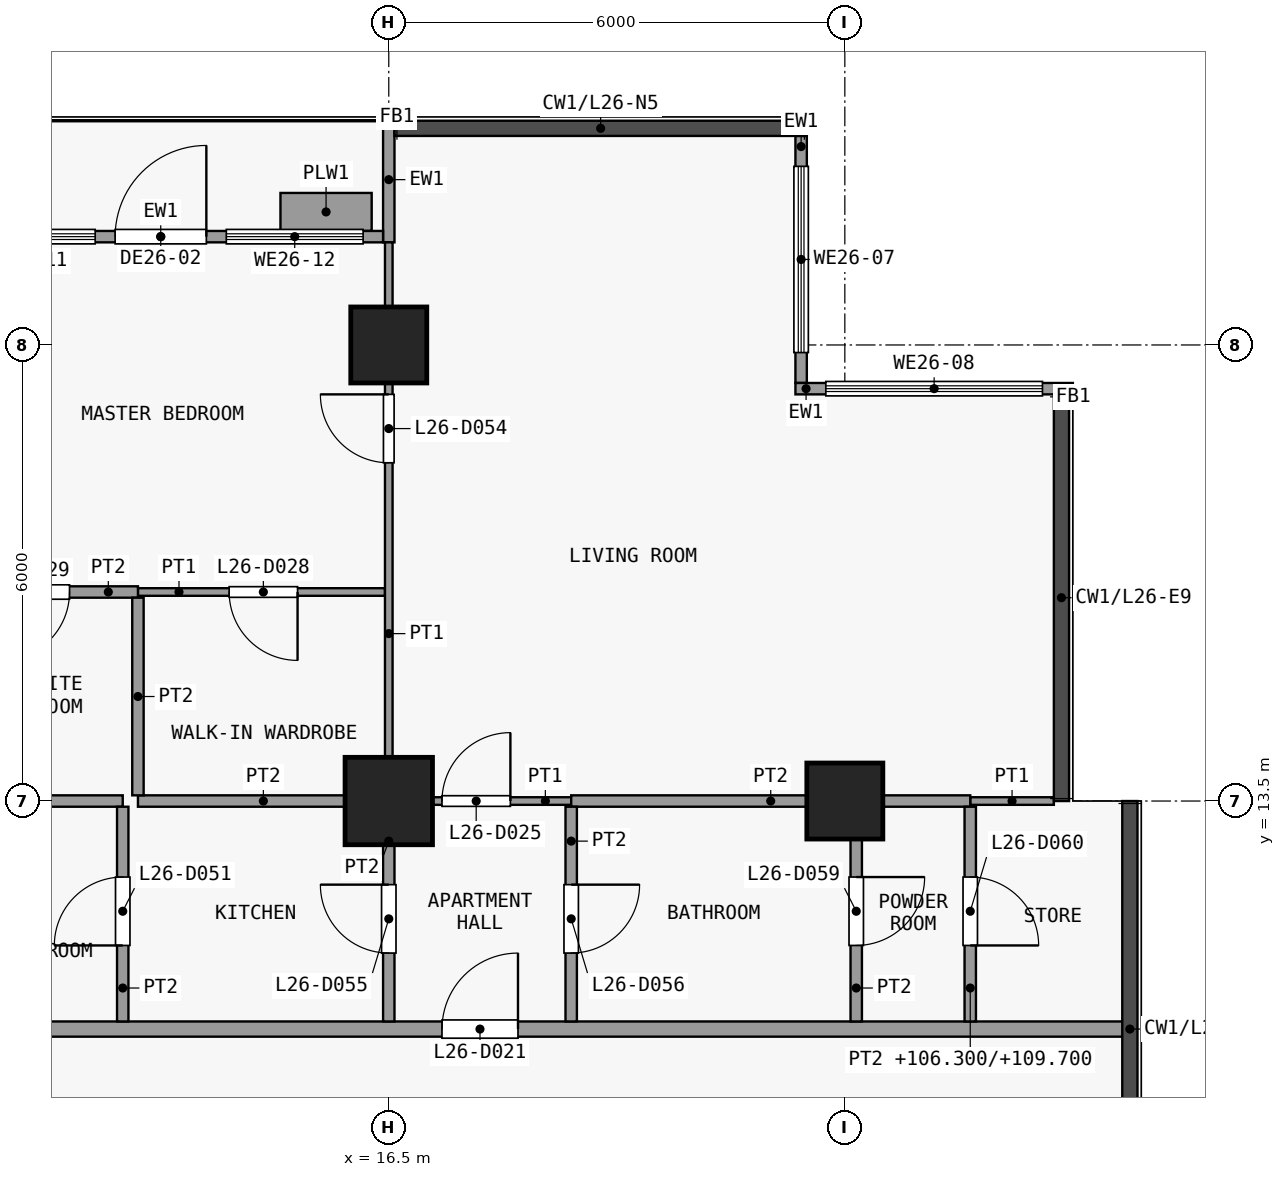
"""IFC4 building model, lengths in metres.
Left out: names, types, materials, properties, quantities, classifications, styles, units other than length and angle.
Written with IfcOpenShell. Run it as: python <this file> out.ifc"""

import sys

from ifc_helpers import new_model, si_unit, direction, frame, frame_2d, origin, origin_2d, place, context, subcontext, project, spatial, rectangle, extrude, element, fill, save


model = new_model("IFC4")
c1 = context("Model", 3, precision=1e-05, world=origin(), true_north=direction((0.0, 1.0)))
c2 = subcontext(c1, "Body", "Model", "MODEL_VIEW")
j1 = project(units=[si_unit("LENGTHUNIT", "METRE"), si_unit("PLANEANGLEUNIT", "RADIAN")], contexts=[c1])
p1 = place(None, origin())
s1 = spatial("IfcSite", under=j1, at=p1, CompositionType="ELEMENT")
p2 = place(p1, origin())
s2 = spatial("IfcBuilding", under=s1, at=p2, CompositionType="ELEMENT")
p3 = place(p2, frame((0.0, 0.0, 106.3)))
s3 = spatial("IfcBuildingStorey", under=s2, at=p3, CompositionType="ELEMENT", Elevation=106.3)
p4 = place(p3, frame((16.5, 13.5, 0.0), z_axis=(0.0, 0.0, 1.0), x_axis=(1.0, 0.0, 0.0)))
e1 = element("IfcColumn", 1, at=p4, inside=s3, PredefinedType="COLUMN", context=c2, shape_type="SweptSolid", body=[
    extrude(rectangle(XDim=1.15, YDim=1.15, at=origin_2d()), origin(), (0.0, 0.0, 1.0), 3.6),
])
for number, where, z_axis, x_axis in (
    (2, (16.5, 19.5, 0.0), (0.0, 0.0, 1.0), (1.0, 0.0, 0.0)),
    (3, (22.5, 13.5, 0.0), (0.0, 0.0, 1.0), (1.0, 0.0, 0.0)),
):
    element("IfcColumn", number, at=place(p3, frame(where, z_axis=z_axis, x_axis=x_axis)), inside=s3, PredefinedType="COLUMN", context=c2, shape_type="SweptSolid", body=[
        extrude(rectangle(XDim=1.0, YDim=1.0, at=origin_2d()), origin(), (0.0, 0.0, 1.0), 3.6),
    ])
p5 = place(p3, frame((21.925, 22.25, 0.0), z_axis=(0.0, 0.0, 1.0), x_axis=(0.0, -1.0, 0.0)))
e4 = element("IfcWall", 4, at=p5, inside=s3, PredefinedType="SOLIDWALL", context=c2, shape_type="SweptSolid", body=[
    extrude(rectangle(XDim=3.25, YDim=0.15, at=frame_2d((1.625, 0.0))), origin(), (0.0, 0.0, 1.0), 3.3),
])
p6 = place(p5, frame((0.4, 0.0, 0.9)))
e5 = element("IfcOpeningElement", 5, at=p6, cuts=e4, PredefinedType="OPENING", context=c2, shape_type="SweptSolid", body=[
    extrude(rectangle(XDim=2.45, YDim=2.4, at=frame_2d((1.225, 1.2))), frame((0.0, 0.085, 0.0), z_axis=(0.0, -1.0, 0.0), x_axis=(1.0, 0.0, 0.0)), (0.0, 0.0, 1.0), 0.17),
])
p7 = place(p3, frame((21.85, 18.925, 0.0), z_axis=(0.0, 0.0, 1.0), x_axis=(1.0, 0.0, 0.0)))
e6 = element("IfcWall", 6, at=p7, inside=s3, PredefinedType="SOLIDWALL", context=c2, shape_type="SweptSolid", body=[
    extrude(rectangle(XDim=3.65, YDim=0.15, at=frame_2d((1.825, 0.0))), origin(), (0.0, 0.0, 1.0), 3.3),
])
p8 = place(p7, frame((0.4, 0.0, 0.9)))
e7 = element("IfcOpeningElement", 7, at=p8, cuts=e6, PredefinedType="OPENING", context=c2, shape_type="SweptSolid", body=[
    extrude(rectangle(XDim=2.85, YDim=2.4, at=frame_2d((1.425, 1.2))), frame((0.0, 0.085, 0.0), z_axis=(0.0, -1.0, 0.0), x_axis=(1.0, 0.0, 0.0)), (0.0, 0.0, 1.0), 0.17),
])
p9 = place(p3, frame((16.5, 20.85, 0.0), z_axis=(0.0, 0.0, 1.0), x_axis=(0.0, 1.0, 0.0)))
e8 = element("IfcWall", 8, at=p9, inside=s3, PredefinedType="SOLIDWALL", context=c2, shape_type="SweptSolid", body=[
    extrude(rectangle(XDim=1.65, YDim=0.15, at=frame_2d((0.825, 0.0))), origin(), (0.0, 0.0, 1.0), 3.3),
])
p10 = place(p3, frame((10.575, 20.925, 0.0), z_axis=(0.0, 0.0, 1.0), x_axis=(1.0, 0.0, 0.0)))
e9 = element("IfcWall", 9, at=p10, inside=s3, PredefinedType="SOLIDWALL", context=c2, shape_type="SweptSolid", body=[
    extrude(rectangle(XDim=5.85, YDim=0.15, at=frame_2d((2.925, 0.0))), origin(), (0.0, 0.0, 1.0), 3.3),
])
p11 = place(p10, frame((2.325, 0.0, 0.0)))
e10 = element("IfcOpeningElement", 10, at=p11, cuts=e9, PredefinedType="OPENING", context=c2, shape_type="SweptSolid", body=[
    extrude(rectangle(XDim=1.2, YDim=2.4, at=frame_2d((0.6, 1.2))), frame((0.0, 0.085, 0.0), z_axis=(0.0, -1.0, 0.0), x_axis=(1.0, 0.0, 0.0)), (0.0, 0.0, 1.0), 0.17),
])
p12 = place(p10, frame((0.262, 0.0, 0.9)))
e11 = element("IfcOpeningElement", 11, at=p12, cuts=e9, PredefinedType="OPENING", context=c2, shape_type="SweptSolid", body=[
    extrude(rectangle(XDim=1.8, YDim=2.1, at=frame_2d((0.9, 1.05))), frame((0.0, 0.085, 0.0), z_axis=(0.0, -1.0, 0.0), x_axis=(1.0, 0.0, 0.0)), (0.0, 0.0, 1.0), 0.17),
])
p13 = place(p10, frame((3.788, 0.0, 0.9)))
e12 = element("IfcOpeningElement", 12, at=p13, cuts=e9, PredefinedType="OPENING", context=c2, shape_type="SweptSolid", body=[
    extrude(rectangle(XDim=1.8, YDim=2.1, at=frame_2d((0.9, 1.05))), frame((0.0, 0.085, 0.0), z_axis=(0.0, -1.0, 0.0), x_axis=(1.0, 0.0, 0.0)), (0.0, 0.0, 1.0), 0.17),
])
p14 = place(p3, frame((15.075, 21.25, 0.0), z_axis=(0.0, 0.0, 1.0), x_axis=(1.0, 0.0, 0.0)))
e13 = element("IfcWall", 13, at=p14, inside=s3, PredefinedType="USERDEFINED", context=c2, shape_type="SweptSolid", body=[
    extrude(rectangle(XDim=1.2, YDim=0.5, at=frame_2d((0.6, 0.0))), origin(), (0.0, 0.0, 1.0), 0.9),
])
p15 = place(p3, frame((-23.85, 10.5, 0.0), z_axis=(0.0, 0.0, 1.0), x_axis=(1.0, 0.0, 0.0)))
e14 = element("IfcWall", 14, at=p15, inside=s3, PredefinedType="PARTITIONING", context=c2, shape_type="SweptSolid", body=[
    extrude(rectangle(XDim=50.1, YDim=0.2, at=frame_2d((25.05, 0.0))), origin(), (0.0, 0.0, 1.0), 3.3),
])
p16 = place(p15, frame((9.05, 0.0, 0.0)))
e15 = element("IfcOpeningElement", 15, at=p16, cuts=e14, PredefinedType="OPENING", context=c2, shape_type="SweptSolid", body=[
    extrude(rectangle(XDim=1.0, YDim=2.1, at=frame_2d((0.5, 1.05))), frame((0.0, 0.11, 0.0), z_axis=(0.0, -1.0, 0.0), x_axis=(1.0, 0.0, 0.0)), (0.0, 0.0, 1.0), 0.22),
])
p17 = place(p15, frame((14.05, 0.0, 0.0)))
e16 = element("IfcOpeningElement", 16, at=p17, cuts=e14, PredefinedType="OPENING", context=c2, shape_type="SweptSolid", body=[
    extrude(rectangle(XDim=1.0, YDim=2.1, at=frame_2d((0.5, 1.05))), frame((0.0, 0.11, 0.0), z_axis=(0.0, -1.0, 0.0), x_axis=(1.0, 0.0, 0.0)), (0.0, 0.0, 1.0), 0.22),
])
p18 = place(p15, frame((29.05, 0.0, 0.0)))
e17 = element("IfcOpeningElement", 17, at=p18, cuts=e14, PredefinedType="OPENING", context=c2, shape_type="SweptSolid", body=[
    extrude(rectangle(XDim=1.0, YDim=2.1, at=frame_2d((0.5, 1.05))), frame((0.0, 0.11, 0.0), z_axis=(0.0, -1.0, 0.0), x_axis=(1.0, 0.0, 0.0)), (0.0, 0.0, 1.0), 0.22),
])
p19 = place(p15, frame((41.05, 0.0, 0.0)))
e18 = element("IfcOpeningElement", 18, at=p19, cuts=e14, PredefinedType="OPENING", context=c2, shape_type="SweptSolid", body=[
    extrude(rectangle(XDim=1.0, YDim=2.1, at=frame_2d((0.5, 1.05))), frame((0.0, 0.11, 0.0), z_axis=(0.0, -1.0, 0.0), x_axis=(1.0, 0.0, 0.0)), (0.0, 0.0, 1.0), 0.22),
])
p20 = place(p3, frame((16.5, 13.5, 0.0), z_axis=(0.0, 0.0, 1.0), x_axis=(1.0, 0.0, 0.0)))
e19 = element("IfcWall", 19, at=p20, inside=s3, PredefinedType="PARTITIONING", context=c2, shape_type="SweptSolid", body=[
    extrude(rectangle(XDim=2.4, YDim=0.1, at=frame_2d((1.2, 0.0))), origin(), (0.0, 0.0, 1.0), 3.3),
])
p21 = place(p20, frame((0.7, 0.0, 0.0)))
e20 = element("IfcOpeningElement", 20, at=p21, cuts=e19, PredefinedType="OPENING", context=c2, shape_type="SweptSolid", body=[
    extrude(rectangle(XDim=0.9, YDim=2.1, at=frame_2d((0.45, 1.05))), frame((0.0, 0.06, 0.0), z_axis=(0.0, -1.0, 0.0), x_axis=(1.0, 0.0, 0.0)), (0.0, 0.0, 1.0), 0.12),
])
p22 = place(p3, frame((24.15, 13.5, 0.0), z_axis=(0.0, 0.0, 1.0), x_axis=(1.0, 0.0, 0.0)))
e21 = element("IfcWall", 21, at=p22, inside=s3, PredefinedType="PARTITIONING", context=c2, shape_type="SweptSolid", body=[
    extrude(rectangle(XDim=1.1, YDim=0.1, at=frame_2d((0.55, 0.0))), origin(), (0.0, 0.0, 1.0), 3.3),
])
p23 = place(p3, frame((6.9, 13.5, 0.0), z_axis=(0.0, 0.0, 1.0), x_axis=(1.0, 0.0, 0.0)))
e22 = element("IfcWall", 22, at=p23, inside=s3, PredefinedType="PARTITIONING", context=c2, shape_type="SweptSolid", body=[
    extrude(rectangle(XDim=6.1, YDim=0.15, at=frame_2d((3.05, 0.0))), origin(), (0.0, 0.0, 1.0), 3.3),
])
p24 = place(p3, frame((13.2, 13.5, 0.0), z_axis=(0.0, 0.0, 1.0), x_axis=(1.0, 0.0, 0.0)))
e23 = element("IfcWall", 23, at=p24, inside=s3, PredefinedType="PARTITIONING", context=c2, shape_type="SweptSolid", body=[
    extrude(rectangle(XDim=3.3, YDim=0.15, at=frame_2d((1.65, 0.0))), origin(), (0.0, 0.0, 1.0), 3.3),
])
p25 = place(p3, frame((18.9, 13.5, 0.0), z_axis=(0.0, 0.0, 1.0), x_axis=(1.0, 0.0, 0.0)))
e24 = element("IfcWall", 24, at=p25, inside=s3, PredefinedType="PARTITIONING", context=c2, shape_type="SweptSolid", body=[
    extrude(rectangle(XDim=5.25, YDim=0.15, at=frame_2d((2.625, 0.0))), origin(), (0.0, 0.0, 1.0), 3.3),
])
p26 = place(p3, frame((13.2, 16.25, 0.0), z_axis=(0.0, 0.0, 1.0), x_axis=(1.0, 0.0, 0.0)))
e25 = element("IfcWall", 25, at=p26, inside=s3, PredefinedType="PARTITIONING", context=c2, shape_type="SweptSolid", body=[
    extrude(rectangle(XDim=3.25, YDim=0.1, at=frame_2d((1.625, 0.0))), origin(), (0.0, 0.0, 1.0), 3.3),
])
p27 = place(p26, frame((1.2, 0.0, 0.0)))
e26 = element("IfcOpeningElement", 26, at=p27, cuts=e25, PredefinedType="OPENING", context=c2, shape_type="SweptSolid", body=[
    extrude(rectangle(XDim=0.9, YDim=2.1, at=frame_2d((0.45, 1.05))), frame((0.0, 0.06, 0.0), z_axis=(0.0, -1.0, 0.0), x_axis=(1.0, 0.0, 0.0)), (0.0, 0.0, 1.0), 0.12),
])
p28 = place(p3, frame((10.6, 16.25, 0.0), z_axis=(0.0, 0.0, 1.0), x_axis=(1.0, 0.0, 0.0)))
e27 = element("IfcWall", 27, at=p28, inside=s3, PredefinedType="PARTITIONING", context=c2, shape_type="SweptSolid", body=[
    extrude(rectangle(XDim=2.6, YDim=0.15, at=frame_2d((1.3, 0.0))), origin(), (0.0, 0.0, 1.0), 3.3),
])
p29 = place(p28, frame((0.8, 0.0, 0.0)))
e28 = element("IfcOpeningElement", 28, at=p29, cuts=e27, PredefinedType="OPENING", context=c2, shape_type="SweptSolid", body=[
    extrude(rectangle(XDim=0.9, YDim=2.1, at=frame_2d((0.45, 1.05))), frame((0.0, 0.085, 0.0), z_axis=(0.0, -1.0, 0.0), x_axis=(1.0, 0.0, 0.0)), (0.0, 0.0, 1.0), 0.17),
])
p30 = place(p3, frame((13.0, 10.6, 0.0), z_axis=(0.0, 0.0, 1.0), x_axis=(0.0, 1.0, 0.0)))
e29 = element("IfcWall", 29, at=p30, inside=s3, PredefinedType="PARTITIONING", context=c2, shape_type="SweptSolid", body=[
    extrude(rectangle(XDim=2.825, YDim=0.15, at=frame_2d((1.413, 0.0))), origin(), (0.0, 0.0, 1.0), 3.3),
])
p31 = place(p30, frame((1.0, 0.0, 0.0)))
e30 = element("IfcOpeningElement", 30, at=p31, cuts=e29, PredefinedType="OPENING", context=c2, shape_type="SweptSolid", body=[
    extrude(rectangle(XDim=0.9, YDim=2.1, at=frame_2d((0.45, 1.05))), frame((0.0, 0.085, 0.0), z_axis=(0.0, -1.0, 0.0), x_axis=(1.0, 0.0, 0.0)), (0.0, 0.0, 1.0), 0.17),
])
p32 = place(p3, frame((13.2, 13.575, 0.0), z_axis=(0.0, 0.0, 1.0), x_axis=(0.0, 1.0, 0.0)))
e31 = element("IfcWall", 31, at=p32, inside=s3, PredefinedType="PARTITIONING", context=c2, shape_type="SweptSolid", body=[
    extrude(rectangle(XDim=2.6, YDim=0.15, at=frame_2d((1.3, 0.0))), origin(), (0.0, 0.0, 1.0), 3.3),
])
p33 = place(p3, frame((16.5, 13.575, 0.0), z_axis=(0.0, 0.0, 1.0), x_axis=(0.0, 1.0, 0.0)))
e32 = element("IfcWall", 32, at=p33, inside=s3, PredefinedType="PARTITIONING", context=c2, shape_type="SweptSolid", body=[
    extrude(rectangle(XDim=7.275, YDim=0.1, at=frame_2d((3.638, 0.0))), origin(), (0.0, 0.0, 1.0), 3.3),
])
p34 = place(p33, frame((4.375, 0.0, 0.0)))
e33 = element("IfcOpeningElement", 33, at=p34, cuts=e32, PredefinedType="OPENING", context=c2, shape_type="SweptSolid", body=[
    extrude(rectangle(XDim=0.9, YDim=2.1, at=frame_2d((0.45, 1.05))), frame((0.0, 0.06, 0.0), z_axis=(0.0, -1.0, 0.0), x_axis=(1.0, 0.0, 0.0)), (0.0, 0.0, 1.0), 0.12),
])
p35 = place(p3, frame((16.5, 10.6, 0.0), z_axis=(0.0, 0.0, 1.0), x_axis=(0.0, 1.0, 0.0)))
e34 = element("IfcWall", 34, at=p35, inside=s3, PredefinedType="PARTITIONING", context=c2, shape_type="SweptSolid", body=[
    extrude(rectangle(XDim=2.825, YDim=0.15, at=frame_2d((1.413, 0.0))), origin(), (0.0, 0.0, 1.0), 3.3),
])
p36 = place(p35, frame((0.9, 0.0, 0.0)))
e35 = element("IfcOpeningElement", 35, at=p36, cuts=e34, PredefinedType="OPENING", context=c2, shape_type="SweptSolid", body=[
    extrude(rectangle(XDim=0.9, YDim=2.1, at=frame_2d((0.45, 1.05))), frame((0.0, 0.085, 0.0), z_axis=(0.0, -1.0, 0.0), x_axis=(1.0, 0.0, 0.0)), (0.0, 0.0, 1.0), 0.17),
])
p37 = place(p3, frame((18.9, 10.6, 0.0), z_axis=(0.0, 0.0, 1.0), x_axis=(0.0, 1.0, 0.0)))
e36 = element("IfcWall", 36, at=p37, inside=s3, PredefinedType="PARTITIONING", context=c2, shape_type="SweptSolid", body=[
    extrude(rectangle(XDim=2.825, YDim=0.15, at=frame_2d((1.413, 0.0))), origin(), (0.0, 0.0, 1.0), 3.3),
])
p38 = place(p37, frame((0.9, 0.0, 0.0)))
e37 = element("IfcOpeningElement", 37, at=p38, cuts=e36, PredefinedType="OPENING", context=c2, shape_type="SweptSolid", body=[
    extrude(rectangle(XDim=0.9, YDim=2.1, at=frame_2d((0.45, 1.05))), frame((0.0, 0.085, 0.0), z_axis=(0.0, -1.0, 0.0), x_axis=(1.0, 0.0, 0.0)), (0.0, 0.0, 1.0), 0.17),
])
p39 = place(p3, frame((22.65, 10.6, 0.0), z_axis=(0.0, 0.0, 1.0), x_axis=(0.0, 1.0, 0.0)))
e38 = element("IfcWall", 38, at=p39, inside=s3, PredefinedType="PARTITIONING", context=c2, shape_type="SweptSolid", body=[
    extrude(rectangle(XDim=2.825, YDim=0.15, at=frame_2d((1.413, 0.0))), origin(), (0.0, 0.0, 1.0), 3.3),
])
p40 = place(p39, frame((1.0, 0.0, 0.0)))
e39 = element("IfcOpeningElement", 39, at=p40, cuts=e38, PredefinedType="OPENING", context=c2, shape_type="SweptSolid", body=[
    extrude(rectangle(XDim=0.9, YDim=2.1, at=frame_2d((0.45, 1.05))), frame((0.0, 0.085, 0.0), z_axis=(0.0, -1.0, 0.0), x_axis=(1.0, 0.0, 0.0)), (0.0, 0.0, 1.0), 0.17),
])
p41 = place(p3, frame((24.15, 10.6, 0.0), z_axis=(0.0, 0.0, 1.0), x_axis=(0.0, 1.0, 0.0)))
e40 = element("IfcWall", 40, at=p41, inside=s3, PredefinedType="PARTITIONING", context=c2, shape_type="SweptSolid", body=[
    extrude(rectangle(XDim=2.825, YDim=0.15, at=frame_2d((1.413, 0.0))), origin(), (0.0, 0.0, 1.0), 3.4),
])
p42 = place(p41, frame((1.0, 0.0, 0.0)))
e41 = element("IfcOpeningElement", 41, at=p42, cuts=e40, PredefinedType="OPENING", context=c2, shape_type="SweptSolid", body=[
    extrude(rectangle(XDim=0.9, YDim=2.1, at=frame_2d((0.45, 1.05))), frame((0.0, 0.085, 0.0), z_axis=(0.0, -1.0, 0.0), x_axis=(1.0, 0.0, 0.0)), (0.0, 0.0, 1.0), 0.17),
])
p43 = place(p6, origin())
e42 = element("IfcWindow", 42, at=p43, inside=s3, PartitioningType="SINGLE_PANEL", PredefinedType="WINDOW", context=c2, shape_type="SweptSolid", body=[
    extrude(rectangle(XDim=2.45, YDim=2.4, at=frame_2d((1.225, 1.2))), frame((0.0, 0.03, 0.0), z_axis=(0.0, -1.0, 0.0), x_axis=(1.0, 0.0, 0.0)), (0.0, 0.0, 1.0), 0.06),
])
fill(e5, e42)
p44 = place(p8, origin())
e43 = element("IfcWindow", 43, at=p44, inside=s3, PartitioningType="SINGLE_PANEL", PredefinedType="WINDOW", context=c2, shape_type="SweptSolid", body=[
    extrude(rectangle(XDim=2.85, YDim=2.4, at=frame_2d((1.425, 1.2))), frame((0.0, 0.03, 0.0), z_axis=(0.0, -1.0, 0.0), x_axis=(1.0, 0.0, 0.0)), (0.0, 0.0, 1.0), 0.06),
])
fill(e7, e43)
p45 = place(p11, origin())
e44 = element("IfcDoor", 44, at=p45, inside=s3, OperationType="SINGLE_SWING_RIGHT", PredefinedType="DOOR", context=c2, shape_type="SweptSolid", body=[
    extrude(rectangle(XDim=1.2, YDim=2.4, at=frame_2d((0.6, 1.2))), frame((0.0, 0.025, 0.0), z_axis=(0.0, -1.0, 0.0), x_axis=(1.0, 0.0, 0.0)), (0.0, 0.0, 1.0), 0.05),
])
fill(e10, e44)
p46 = place(p12, origin())
e45 = element("IfcWindow", 45, at=p46, inside=s3, PartitioningType="SINGLE_PANEL", PredefinedType="WINDOW", context=c2, shape_type="SweptSolid", body=[
    extrude(rectangle(XDim=1.8, YDim=2.1, at=frame_2d((0.9, 1.05))), frame((0.0, 0.03, 0.0), z_axis=(0.0, -1.0, 0.0), x_axis=(1.0, 0.0, 0.0)), (0.0, 0.0, 1.0), 0.06),
])
fill(e11, e45)
p47 = place(p13, origin())
e46 = element("IfcWindow", 46, at=p47, inside=s3, PartitioningType="SINGLE_PANEL", PredefinedType="WINDOW", context=c2, shape_type="SweptSolid", body=[
    extrude(rectangle(XDim=1.8, YDim=2.1, at=frame_2d((0.9, 1.05))), frame((0.0, 0.03, 0.0), z_axis=(0.0, -1.0, 0.0), x_axis=(1.0, 0.0, 0.0)), (0.0, 0.0, 1.0), 0.06),
])
fill(e12, e46)
p48 = place(p19, origin())
e47 = element("IfcDoor", 47, at=p48, inside=s3, OperationType="SINGLE_SWING_LEFT", PredefinedType="DOOR", context=c2, shape_type="SweptSolid", body=[
    extrude(rectangle(XDim=1.0, YDim=2.1, at=frame_2d((0.5, 1.05))), frame((0.0, 0.025, 0.0), z_axis=(0.0, -1.0, 0.0), x_axis=(1.0, 0.0, 0.0)), (0.0, 0.0, 1.0), 0.05),
])
fill(e18, e47)
p49 = place(p21, origin())
e48 = element("IfcDoor", 48, at=p49, inside=s3, OperationType="SINGLE_SWING_LEFT", PredefinedType="DOOR", context=c2, shape_type="SweptSolid", body=[
    extrude(rectangle(XDim=0.9, YDim=2.1, at=frame_2d((0.45, 1.05))), frame((0.0, 0.025, 0.0), z_axis=(0.0, -1.0, 0.0), x_axis=(1.0, 0.0, 0.0)), (0.0, 0.0, 1.0), 0.05),
])
fill(e20, e48)
p50 = place(p27, origin())
e49 = element("IfcDoor", 49, at=p50, inside=s3, OperationType="SINGLE_SWING_RIGHT", PredefinedType="DOOR", context=c2, shape_type="SweptSolid", body=[
    extrude(rectangle(XDim=0.9, YDim=2.1, at=frame_2d((0.45, 1.05))), frame((0.0, 0.025, 0.0), z_axis=(0.0, -1.0, 0.0), x_axis=(1.0, 0.0, 0.0)), (0.0, 0.0, 1.0), 0.05),
])
fill(e26, e49)
p51 = place(p29, origin())
e50 = element("IfcDoor", 50, at=p51, inside=s3, OperationType="SINGLE_SWING_LEFT", PredefinedType="DOOR", context=c2, shape_type="SweptSolid", body=[
    extrude(rectangle(XDim=0.9, YDim=2.1, at=frame_2d((0.45, 1.05))), frame((0.0, 0.025, 0.0), z_axis=(0.0, -1.0, 0.0), x_axis=(1.0, 0.0, 0.0)), (0.0, 0.0, 1.0), 0.05),
])
fill(e28, e50)
p52 = place(p31, origin())
e51 = element("IfcDoor", 51, at=p52, inside=s3, OperationType="SINGLE_SWING_RIGHT", PredefinedType="DOOR", context=c2, shape_type="SweptSolid", body=[
    extrude(rectangle(XDim=0.9, YDim=2.1, at=frame_2d((0.45, 1.05))), frame((0.0, 0.025, 0.0), z_axis=(0.0, -1.0, 0.0), x_axis=(1.0, 0.0, 0.0)), (0.0, 0.0, 1.0), 0.05),
])
fill(e30, e51)
p53 = place(p34, origin())
e52 = element("IfcDoor", 52, at=p53, inside=s3, OperationType="SINGLE_SWING_LEFT", PredefinedType="DOOR", context=c2, shape_type="SweptSolid", body=[
    extrude(rectangle(XDim=0.9, YDim=2.1, at=frame_2d((0.45, 1.05))), frame((0.0, 0.025, 0.0), z_axis=(0.0, -1.0, 0.0), x_axis=(1.0, 0.0, 0.0)), (0.0, 0.0, 1.0), 0.05),
])
fill(e33, e52)
p54 = place(p36, origin())
e53 = element("IfcDoor", 53, at=p54, inside=s3, OperationType="SINGLE_SWING_LEFT", PredefinedType="DOOR", context=c2, shape_type="SweptSolid", body=[
    extrude(rectangle(XDim=0.9, YDim=2.1, at=frame_2d((0.45, 1.05))), frame((0.0, 0.025, 0.0), z_axis=(0.0, -1.0, 0.0), x_axis=(1.0, 0.0, 0.0)), (0.0, 0.0, 1.0), 0.05),
])
fill(e35, e53)
p55 = place(p38, origin())
e54 = element("IfcDoor", 54, at=p55, inside=s3, OperationType="SINGLE_SWING_RIGHT", PredefinedType="DOOR", context=c2, shape_type="SweptSolid", body=[
    extrude(rectangle(XDim=0.9, YDim=2.1, at=frame_2d((0.45, 1.05))), frame((0.0, 0.025, 0.0), z_axis=(0.0, -1.0, 0.0), x_axis=(1.0, 0.0, 0.0)), (0.0, 0.0, 1.0), 0.05),
])
fill(e37, e54)
p56 = place(p40, origin())
e55 = element("IfcDoor", 55, at=p56, inside=s3, OperationType="SINGLE_SWING_RIGHT", PredefinedType="DOOR", context=c2, shape_type="SweptSolid", body=[
    extrude(rectangle(XDim=0.9, YDim=2.1, at=frame_2d((0.45, 1.05))), frame((0.0, 0.025, 0.0), z_axis=(0.0, -1.0, 0.0), x_axis=(1.0, 0.0, 0.0)), (0.0, 0.0, 1.0), 0.05),
])
fill(e39, e55)
p57 = place(p42, origin())
e56 = element("IfcDoor", 56, at=p57, inside=s3, OperationType="SINGLE_SWING_LEFT", PredefinedType="DOOR", context=c2, shape_type="SweptSolid", body=[
    extrude(rectangle(XDim=0.9, YDim=2.1, at=frame_2d((0.45, 1.05))), frame((0.0, 0.025, 0.0), z_axis=(0.0, -1.0, 0.0), x_axis=(1.0, 0.0, 0.0)), (0.0, 0.0, 1.0), 0.05),
])
fill(e41, e56)
save(model, sys.argv[1])
